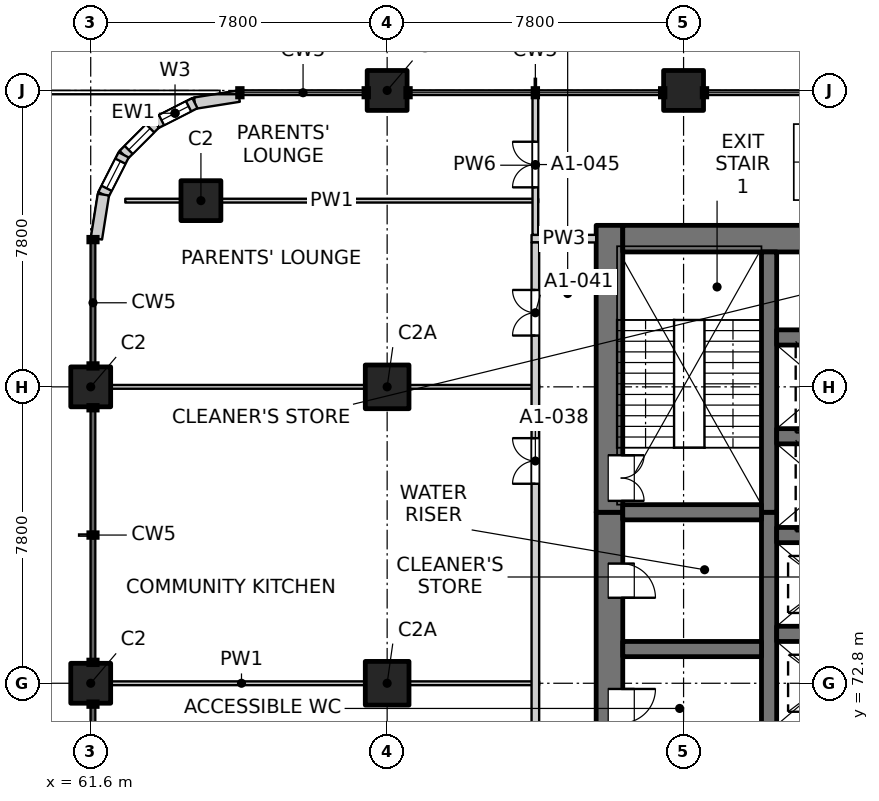
"""IFC4 building model, lengths in metres.
Left out: names, types, materials, properties, quantities, classifications, styles, units other than length and angle.
Written with IfcOpenShell. Run it as: python <this file> out.ifc"""

import sys

from ifc_helpers import new_model, si_unit, direction, frame, frame_2d, origin, origin_2d, place, context, subcontext, project, spatial, rectangle, extrude, element, fill, save


model = new_model("IFC4")
c1 = context("Model", 3, precision=1e-05, world=origin(), true_north=direction((0.0, 1.0)))
c2 = subcontext(c1, "Body", "Model", "MODEL_VIEW")
j1 = project(units=[si_unit("LENGTHUNIT", "METRE"), si_unit("PLANEANGLEUNIT", "RADIAN")], contexts=[c1])
p1 = place(None, origin())
s1 = spatial("IfcSite", under=j1, at=p1, CompositionType="ELEMENT")
p2 = place(p1, origin())
s2 = spatial("IfcBuilding", under=s1, at=p2, CompositionType="ELEMENT")
p3 = place(p2, frame((0.0, 0.0, 15.0)))
s3 = spatial("IfcBuildingStorey", under=s2, at=p3, CompositionType="ELEMENT", Elevation=15.0)
for number, where, z_axis, x_axis in (
    (1, (64.5, 85.5, -0.35), (0.0, 0.0, 1.0), (1.0, 0.0, 0.0)),
    (2, (69.4, 88.4, -0.35), (0.0, 0.0, 1.0), (1.0, 0.0, 0.0)),
    (3, (77.2, 88.4, -0.35), (0.0, 0.0, 1.0), (1.0, 0.0, 0.0)),
    (4, (61.6, 72.8, -0.35), (0.0, 0.0, 1.0), (1.0, 0.0, 0.0)),
    (5, (61.6, 80.6, -0.35), (0.0, 0.0, 1.0), (1.0, 0.0, 0.0)),
):
    element("IfcColumn", number, at=place(p3, frame(where, z_axis=z_axis, x_axis=x_axis)), inside=s3, PredefinedType="COLUMN", context=c2, shape_type="SweptSolid", body=[
        extrude(rectangle(XDim=1.05, YDim=1.05, at=origin_2d()), origin(), (0.0, 0.0, 1.0), 4.6),
    ])
for number, where, z_axis, x_axis in (
    (6, (69.4, 72.8, -0.35), (0.0, 0.0, 1.0), (1.0, 0.0, 0.0)),
    (7, (69.4, 80.6, -0.35), (0.0, 0.0, 1.0), (1.0, 0.0, 0.0)),
):
    element("IfcColumn", number, at=place(p3, frame(where, z_axis=z_axis, x_axis=x_axis)), inside=s3, PredefinedType="COLUMN", context=c2, shape_type="SweptSolid", body=[
        extrude(rectangle(XDim=1.15, YDim=1.15, at=origin_2d()), origin(), (0.0, 0.0, 1.0), 4.6),
    ])
p4 = place(p3, frame((75.25, 54.9, -0.35), z_axis=(0.0, 0.0, 1.0), x_axis=(0.0, 1.0, 0.0)))
e8 = element("IfcWall", 8, at=p4, inside=s3, PredefinedType="SOLIDWALL", context=c2, shape_type="SweptSolid", body=[
    extrude(rectangle(XDim=22.4, YDim=0.7, at=frame_2d((11.2, 0.0))), origin(), (0.0, 0.0, 1.0), 4.6),
])
p5 = place(p4, frame((7.55, 0.0, 0.35)))
e9 = element("IfcOpeningElement", 9, at=p5, cuts=e8, PredefinedType="OPENING", context=c2, shape_type="SweptSolid", body=[
    extrude(rectangle(XDim=0.9, YDim=2.1, at=frame_2d((0.45, 1.05))), frame((0.0, 0.36, 0.0), z_axis=(0.0, -1.0, 0.0), x_axis=(1.0, 0.0, 0.0)), (0.0, 0.0, 1.0), 0.72),
])
p6 = place(p4, frame((10.85, 0.0, 0.35)))
e10 = element("IfcOpeningElement", 10, at=p6, cuts=e8, PredefinedType="OPENING", context=c2, shape_type="SweptSolid", body=[
    extrude(rectangle(XDim=0.9, YDim=2.1, at=frame_2d((0.45, 1.05))), frame((0.0, 0.36, 0.0), z_axis=(0.0, -1.0, 0.0), x_axis=(1.0, 0.0, 0.0)), (0.0, 0.0, 1.0), 0.72),
])
p7 = place(p4, frame((13.85, 0.0, 0.35)))
e11 = element("IfcOpeningElement", 11, at=p7, cuts=e8, PredefinedType="OPENING", context=c2, shape_type="SweptSolid", body=[
    extrude(rectangle(XDim=0.9, YDim=2.1, at=frame_2d((0.45, 1.05))), frame((0.0, 0.36, 0.0), z_axis=(0.0, -1.0, 0.0), x_axis=(1.0, 0.0, 0.0)), (0.0, 0.0, 1.0), 0.72),
])
p8 = place(p4, frame((16.85, 0.0, 0.35)))
e12 = element("IfcOpeningElement", 12, at=p8, cuts=e8, PredefinedType="OPENING", context=c2, shape_type="SweptSolid", body=[
    extrude(rectangle(XDim=0.9, YDim=2.1, at=frame_2d((0.45, 1.05))), frame((0.0, 0.36, 0.0), z_axis=(0.0, -1.0, 0.0), x_axis=(1.0, 0.0, 0.0)), (0.0, 0.0, 1.0), 0.72),
])
p9 = place(p4, frame((20.15, 0.0, 0.35)))
e13 = element("IfcOpeningElement", 13, at=p9, cuts=e8, PredefinedType="OPENING", context=c2, shape_type="SweptSolid", body=[
    extrude(rectangle(XDim=0.9, YDim=2.1, at=frame_2d((0.45, 1.05))), frame((0.0, 0.36, 0.0), z_axis=(0.0, -1.0, 0.0), x_axis=(1.0, 0.0, 0.0)), (0.0, 0.0, 1.0), 0.72),
])
p10 = place(p3, frame((75.25, 77.3, -0.35), z_axis=(0.0, 0.0, 1.0), x_axis=(0.0, 1.0, 0.0)))
e14 = element("IfcWall", 14, at=p10, inside=s3, PredefinedType="SOLIDWALL", context=c2, shape_type="SweptSolid", body=[
    extrude(rectangle(XDim=7.55, YDim=0.7, at=frame_2d((3.775, 0.0))), origin(), (0.0, 0.0, 1.0), 4.6),
])
p11 = place(p10, frame((0.3, 0.0, 0.35)))
e15 = element("IfcOpeningElement", 15, at=p11, cuts=e14, PredefinedType="OPENING", context=c2, shape_type="SweptSolid", body=[
    extrude(rectangle(XDim=1.2, YDim=2.1, at=frame_2d((0.6, 1.05))), frame((0.0, 0.36, 0.0), z_axis=(0.0, -1.0, 0.0), x_axis=(1.0, 0.0, 0.0)), (0.0, 0.0, 1.0), 0.72),
])
p12 = place(p3, frame((75.6, 84.5, -0.35), z_axis=(0.0, 0.0, 1.0), x_axis=(1.0, 0.0, 0.0)))
e16 = element("IfcWall", 16, at=p12, inside=s3, PredefinedType="SOLIDWALL", context=c2, shape_type="SweptSolid", body=[
    extrude(rectangle(XDim=18.8, YDim=0.7, at=frame_2d((9.4, 0.0))), origin(), (0.0, 0.0, 1.0), 4.6),
])
p13 = place(p3, frame((79.45, 60.9, -0.35), z_axis=(0.0, 0.0, 1.0), x_axis=(0.0, 1.0, 0.0)))
e17 = element("IfcWall", 17, at=p13, inside=s3, PredefinedType="SOLIDWALL", context=c2, shape_type="SweptSolid", body=[
    extrude(rectangle(XDim=16.4, YDim=0.4, at=frame_2d((8.2, 0.0))), origin(), (0.0, 0.0, 1.0), 4.6),
])
p14 = place(p3, frame((79.45, 77.3, -0.35), z_axis=(0.0, 0.0, 1.0), x_axis=(0.0, 1.0, 0.0)))
e18 = element("IfcWall", 18, at=p14, inside=s3, PredefinedType="SOLIDWALL", context=c2, shape_type="SweptSolid", body=[
    extrude(rectangle(XDim=6.85, YDim=0.4, at=frame_2d((3.425, 0.0))), origin(), (0.0, 0.0, 1.0), 4.6),
])
for number, where, z_axis, x_axis in (
    (19, (79.65, 74.1, -0.35), (0.0, 0.0, 1.0), (1.0, 0.0, 0.0)),
    (20, (79.65, 76.7, -0.35), (0.0, 0.0, 1.0), (1.0, 0.0, 0.0)),
    (21, (79.65, 79.3, -0.35), (0.0, 0.0, 1.0), (1.0, 0.0, 0.0)),
    (22, (79.65, 81.9, -0.35), (0.0, 0.0, 1.0), (1.0, 0.0, 0.0)),
):
    element("IfcWall", number, at=place(p3, frame(where, z_axis=z_axis, x_axis=x_axis)), inside=s3, PredefinedType="SOLIDWALL", context=c2, shape_type="SweptSolid", body=[
        extrude(rectangle(XDim=3.0, YDim=0.4, at=frame_2d((1.5, 0.0))), origin(), (0.0, 0.0, 1.0), 4.6),
    ])
for number, where, z_axis, x_axis in (
    (23, (75.6, 73.7, -0.35), (0.0, 0.0, 1.0), (1.0, 0.0, 0.0)),
    (24, (75.6, 77.3, -0.35), (0.0, 0.0, 1.0), (1.0, 0.0, 0.0)),
):
    element("IfcWall", number, at=place(p3, frame(where, z_axis=z_axis, x_axis=x_axis)), inside=s3, PredefinedType="SOLIDWALL", context=c2, shape_type="SweptSolid", body=[
        extrude(rectangle(XDim=3.65, YDim=0.4, at=frame_2d((1.825, 0.0))), origin(), (0.0, 0.0, 1.0), 4.6),
    ])
p15 = place(p3, frame((65.5, 88.25, 0.0), z_axis=(0.0, 0.0, 1.0), x_axis=(-0.987678452879, -0.156496880861, 0.0)))
e25 = element("IfcWall", 25, at=p15, inside=s3, PredefinedType="SOLIDWALL", context=c2, shape_type="SweptSolid", body=[
    extrude(rectangle(XDim=1.173, YDim=0.3, at=frame_2d((0.586, 0.0))), origin(), (0.0, 0.0, 1.0), 3.8),
])
p16 = place(p3, frame((64.341, 88.066, 0.0), z_axis=(0.0, 0.0, 1.0), x_axis=(-0.890988677504, -0.454025524128, 0.0)))
e26 = element("IfcWall", 26, at=p16, inside=s3, PredefinedType="SOLIDWALL", context=c2, shape_type="SweptSolid", body=[
    extrude(rectangle(XDim=1.173, YDim=0.3, at=frame_2d((0.587, 0.0))), origin(), (0.0, 0.0, 1.0), 3.8),
])
p17 = place(p16, frame((0.187, 0.0, 0.9)))
e27 = element("IfcOpeningElement", 27, at=p17, cuts=e26, PredefinedType="OPENING", context=c2, shape_type="SweptSolid", body=[
    extrude(rectangle(XDim=0.8, YDim=1.2, at=frame_2d((0.4, 0.6))), frame((0.0, 0.16, 0.0), z_axis=(0.0, -1.0, 0.0), x_axis=(1.0, 0.0, 0.0)), (0.0, 0.0, 1.0), 0.32),
])
p18 = place(p3, frame((63.296, 87.534, 0.0), z_axis=(0.0, 0.0, 1.0), x_axis=(-0.707106781187, -0.707106781187, 0.0)))
e28 = element("IfcWall", 28, at=p18, inside=s3, PredefinedType="SOLIDWALL", context=c2, shape_type="SweptSolid", body=[
    extrude(rectangle(XDim=1.173, YDim=0.3, at=frame_2d((0.586, 0.0))), origin(), (0.0, 0.0, 1.0), 3.8),
])
p19 = place(p18, frame((0.187, 0.0, 0.9)))
e29 = element("IfcOpeningElement", 29, at=p19, cuts=e28, PredefinedType="OPENING", context=c2, shape_type="SweptSolid", body=[
    extrude(rectangle(XDim=0.8, YDim=1.2, at=frame_2d((0.4, 0.6))), frame((0.0, 0.16, 0.0), z_axis=(0.0, -1.0, 0.0), x_axis=(1.0, 0.0, 0.0)), (0.0, 0.0, 1.0), 0.32),
])
p20 = place(p3, frame((62.466, 86.704, 0.0), z_axis=(0.0, 0.0, 1.0), x_axis=(-0.454025524128, -0.890988677504, 0.0)))
e30 = element("IfcWall", 30, at=p20, inside=s3, PredefinedType="SOLIDWALL", context=c2, shape_type="SweptSolid", body=[
    extrude(rectangle(XDim=1.173, YDim=0.3, at=frame_2d((0.587, 0.0))), origin(), (0.0, 0.0, 1.0), 3.8),
])
p21 = place(p20, frame((0.187, 0.0, 0.9)))
e31 = element("IfcOpeningElement", 31, at=p21, cuts=e30, PredefinedType="OPENING", context=c2, shape_type="SweptSolid", body=[
    extrude(rectangle(XDim=0.8, YDim=1.2, at=frame_2d((0.4, 0.6))), frame((0.0, 0.16, 0.0), z_axis=(0.0, -1.0, 0.0), x_axis=(1.0, 0.0, 0.0)), (0.0, 0.0, 1.0), 0.32),
])
p22 = place(p3, frame((61.934, 85.659, 0.0), z_axis=(0.0, 0.0, 1.0), x_axis=(-0.156496880861, -0.987678452879, 0.0)))
e32 = element("IfcWall", 32, at=p22, inside=s3, PredefinedType="SOLIDWALL", context=c2, shape_type="SweptSolid", body=[
    extrude(rectangle(XDim=1.173, YDim=0.3, at=frame_2d((0.586, 0.0))), origin(), (0.0, 0.0, 1.0), 3.8),
])
p23 = place(p3, frame((61.735, 72.8, 0.0), z_axis=(0.0, 0.0, 1.0), x_axis=(1.0, 0.0, 0.0)))
e33 = element("IfcWall", 33, at=p23, inside=s3, PredefinedType="PARTITIONING", context=c2, shape_type="SweptSolid", body=[
    extrude(rectangle(XDim=7.665, YDim=0.1, at=frame_2d((3.833, 0.0))), origin(), (0.0, 0.0, 1.0), 3.65),
])
p24 = place(p3, frame((69.4, 72.8, 0.0), z_axis=(0.0, 0.0, 1.0), x_axis=(1.0, 0.0, 0.0)))
e34 = element("IfcWall", 34, at=p24, inside=s3, PredefinedType="PARTITIONING", context=c2, shape_type="SweptSolid", body=[
    extrude(rectangle(XDim=4.0, YDim=0.1, at=frame_2d((2.0, 0.0))), origin(), (0.0, 0.0, 1.0), 4.25),
])
p25 = place(p3, frame((61.735, 80.6, 0.0), z_axis=(0.0, 0.0, 1.0), x_axis=(1.0, 0.0, 0.0)))
e35 = element("IfcWall", 35, at=p25, inside=s3, PredefinedType="PARTITIONING", context=c2, shape_type="SweptSolid", body=[
    extrude(rectangle(XDim=7.665, YDim=0.1, at=frame_2d((3.833, 0.0))), origin(), (0.0, 0.0, 1.0), 3.65),
])
p26 = place(p3, frame((69.4, 80.6, 0.0), z_axis=(0.0, 0.0, 1.0), x_axis=(1.0, 0.0, 0.0)))
e36 = element("IfcWall", 36, at=p26, inside=s3, PredefinedType="PARTITIONING", context=c2, shape_type="SweptSolid", body=[
    extrude(rectangle(XDim=4.0, YDim=0.1, at=frame_2d((2.0, 0.0))), origin(), (0.0, 0.0, 1.0), 4.25),
])
p27 = place(p3, frame((73.2, 84.5, 0.0), z_axis=(0.0, 0.0, 1.0), x_axis=(1.0, 0.0, 0.0)))
e37 = element("IfcWall", 37, at=p27, inside=s3, PredefinedType="PARTITIONING", context=c2, shape_type="SweptSolid", body=[
    extrude(rectangle(XDim=1.7, YDim=0.2, at=frame_2d((0.85, 0.0))), origin(), (0.0, 0.0, 1.0), 4.25),
])
p28 = place(p3, frame((62.51, 85.5, 0.0), z_axis=(0.0, 0.0, 1.0), x_axis=(1.0, 0.0, 0.0)))
e38 = element("IfcWall", 38, at=p28, inside=s3, PredefinedType="PARTITIONING", context=c2, shape_type="SweptSolid", body=[
    extrude(rectangle(XDim=10.865, YDim=0.1, at=frame_2d((5.433, 0.0))), origin(), (0.0, 0.0, 1.0), 4.25),
])
p29 = place(p3, frame((73.3, 49.5, 0.0), z_axis=(0.0, 0.0, 1.0), x_axis=(0.0, 1.0, 0.0)))
e39 = element("IfcWall", 39, at=p29, inside=s3, PredefinedType="PARTITIONING", context=c2, shape_type="SweptSolid", body=[
    extrude(rectangle(XDim=34.9, YDim=0.2, at=frame_2d((17.45, 0.0))), origin(), (0.0, 0.0, 1.0), 4.25),
])
p30 = place(p29, frame((6.2, 0.0, 0.0)))
e40 = element("IfcOpeningElement", 40, at=p30, cuts=e39, PredefinedType="OPENING", context=c2, shape_type="SweptSolid", body=[
    extrude(rectangle(XDim=1.2, YDim=2.1, at=frame_2d((0.6, 1.05))), frame((0.0, 0.11, 0.0), z_axis=(0.0, -1.0, 0.0), x_axis=(1.0, 0.0, 0.0)), (0.0, 0.0, 1.0), 0.22),
])
p31 = place(p29, frame((9.05, 0.0, 0.0)))
e41 = element("IfcOpeningElement", 41, at=p31, cuts=e39, PredefinedType="OPENING", context=c2, shape_type="SweptSolid", body=[
    extrude(rectangle(XDim=1.2, YDim=2.1, at=frame_2d((0.6, 1.05))), frame((0.0, 0.11, 0.0), z_axis=(0.0, -1.0, 0.0), x_axis=(1.0, 0.0, 0.0)), (0.0, 0.0, 1.0), 0.22),
])
p32 = place(p29, frame((28.55, 0.0, 0.0)))
e42 = element("IfcOpeningElement", 42, at=p32, cuts=e39, PredefinedType="OPENING", context=c2, shape_type="SweptSolid", body=[
    extrude(rectangle(XDim=1.2, YDim=2.1, at=frame_2d((0.6, 1.05))), frame((0.0, 0.11, 0.0), z_axis=(0.0, -1.0, 0.0), x_axis=(1.0, 0.0, 0.0)), (0.0, 0.0, 1.0), 0.22),
])
p33 = place(p29, frame((32.45, 0.0, 0.0)))
e43 = element("IfcOpeningElement", 43, at=p33, cuts=e39, PredefinedType="OPENING", context=c2, shape_type="SweptSolid", body=[
    extrude(rectangle(XDim=1.2, YDim=2.1, at=frame_2d((0.6, 1.05))), frame((0.0, 0.11, 0.0), z_axis=(0.0, -1.0, 0.0), x_axis=(1.0, 0.0, 0.0)), (0.0, 0.0, 1.0), 0.22),
])
p34 = place(p3, frame((73.3, 84.6, 0.0), z_axis=(0.0, 0.0, 1.0), x_axis=(0.0, 1.0, 0.0)))
e44 = element("IfcWall", 44, at=p34, inside=s3, PredefinedType="PARTITIONING", context=c2, shape_type="SweptSolid", body=[
    extrude(rectangle(XDim=3.665, YDim=0.15, at=frame_2d((1.833, 0.0))), origin(), (0.0, 0.0, 1.0), 4.25),
])
p35 = place(p34, frame((1.25, 0.0, 0.0)))
e45 = element("IfcOpeningElement", 45, at=p35, cuts=e44, PredefinedType="OPENING", context=c2, shape_type="SweptSolid", body=[
    extrude(rectangle(XDim=1.2, YDim=2.1, at=frame_2d((0.6, 1.05))), frame((0.0, 0.085, 0.0), z_axis=(0.0, -1.0, 0.0), x_axis=(1.0, 0.0, 0.0)), (0.0, 0.0, 1.0), 0.17),
])
p36 = place(p17, origin())
e46 = element("IfcWindow", 46, at=p36, inside=s3, PartitioningType="SINGLE_PANEL", PredefinedType="WINDOW", context=c2, shape_type="SweptSolid", body=[
    extrude(rectangle(XDim=0.8, YDim=1.2, at=frame_2d((0.4, 0.6))), frame((0.0, 0.03, 0.0), z_axis=(0.0, -1.0, 0.0), x_axis=(1.0, 0.0, 0.0)), (0.0, 0.0, 1.0), 0.06),
])
fill(e27, e46)
p37 = place(p19, origin())
e47 = element("IfcWindow", 47, at=p37, inside=s3, PartitioningType="SINGLE_PANEL", PredefinedType="WINDOW", context=c2, shape_type="SweptSolid", body=[
    extrude(rectangle(XDim=0.8, YDim=1.2, at=frame_2d((0.4, 0.6))), frame((0.0, 0.03, 0.0), z_axis=(0.0, -1.0, 0.0), x_axis=(1.0, 0.0, 0.0)), (0.0, 0.0, 1.0), 0.06),
])
fill(e29, e47)
p38 = place(p21, origin())
e48 = element("IfcWindow", 48, at=p38, inside=s3, PartitioningType="SINGLE_PANEL", PredefinedType="WINDOW", context=c2, shape_type="SweptSolid", body=[
    extrude(rectangle(XDim=0.8, YDim=1.2, at=frame_2d((0.4, 0.6))), frame((0.0, 0.03, 0.0), z_axis=(0.0, -1.0, 0.0), x_axis=(1.0, 0.0, 0.0)), (0.0, 0.0, 1.0), 0.06),
])
fill(e31, e48)
p39 = place(p8, origin())
e49 = element("IfcDoor", 49, at=p39, inside=s3, OperationType="SINGLE_SWING_LEFT", PredefinedType="DOOR", context=c2, shape_type="SweptSolid", body=[
    extrude(rectangle(XDim=0.9, YDim=2.1, at=frame_2d((0.45, 1.05))), frame((0.0, -0.285, 0.0), z_axis=(0.0, -1.0, 0.0), x_axis=(1.0, 0.0, 0.0)), (0.0, 0.0, 1.0), 0.05),
])
fill(e12, e49)
p40 = place(p9, origin())
e50 = element("IfcDoor", 50, at=p40, inside=s3, OperationType="SINGLE_SWING_RIGHT", PredefinedType="DOOR", context=c2, shape_type="SweptSolid", body=[
    extrude(rectangle(XDim=0.9, YDim=2.1, at=frame_2d((0.45, 1.05))), frame((0.0, -0.285, 0.0), z_axis=(0.0, -1.0, 0.0), x_axis=(1.0, 0.0, 0.0)), (0.0, 0.0, 1.0), 0.05),
])
fill(e13, e50)
p41 = place(p11, origin())
e51 = element("IfcDoor", 51, at=p41, inside=s3, OperationType="DOUBLE_DOOR_SINGLE_SWING", PredefinedType="DOOR", context=c2, shape_type="SweptSolid", body=[
    extrude(rectangle(XDim=1.2, YDim=2.1, at=frame_2d((0.6, 1.05))), frame((0.0, -0.285, 0.0), z_axis=(0.0, -1.0, 0.0), x_axis=(1.0, 0.0, 0.0)), (0.0, 0.0, 1.0), 0.05),
])
fill(e15, e51)
p42 = place(p32, origin())
e52 = element("IfcDoor", 52, at=p42, inside=s3, OperationType="DOUBLE_DOOR_SINGLE_SWING", PredefinedType="DOOR", context=c2, shape_type="SweptSolid", body=[
    extrude(rectangle(XDim=1.2, YDim=2.1, at=frame_2d((0.6, 1.05))), frame((0.0, 0.025, 0.0), z_axis=(0.0, -1.0, 0.0), x_axis=(1.0, 0.0, 0.0)), (0.0, 0.0, 1.0), 0.05),
])
fill(e42, e52)
p43 = place(p33, origin())
e53 = element("IfcDoor", 53, at=p43, inside=s3, OperationType="DOUBLE_DOOR_SINGLE_SWING", PredefinedType="DOOR", context=c2, shape_type="SweptSolid", body=[
    extrude(rectangle(XDim=1.2, YDim=2.1, at=frame_2d((0.6, 1.05))), frame((0.0, 0.025, 0.0), z_axis=(0.0, -1.0, 0.0), x_axis=(1.0, 0.0, 0.0)), (0.0, 0.0, 1.0), 0.05),
])
fill(e43, e53)
p44 = place(p35, origin())
e54 = element("IfcDoor", 54, at=p44, inside=s3, OperationType="DOUBLE_DOOR_SINGLE_SWING", PredefinedType="DOOR", context=c2, shape_type="SweptSolid", body=[
    extrude(rectangle(XDim=1.2, YDim=2.1, at=frame_2d((0.6, 1.05))), frame((0.0, 0.025, 0.0), z_axis=(0.0, -1.0, 0.0), x_axis=(1.0, 0.0, 0.0)), (0.0, 0.0, 1.0), 0.05),
])
fill(e45, e54)
save(model, sys.argv[1])
